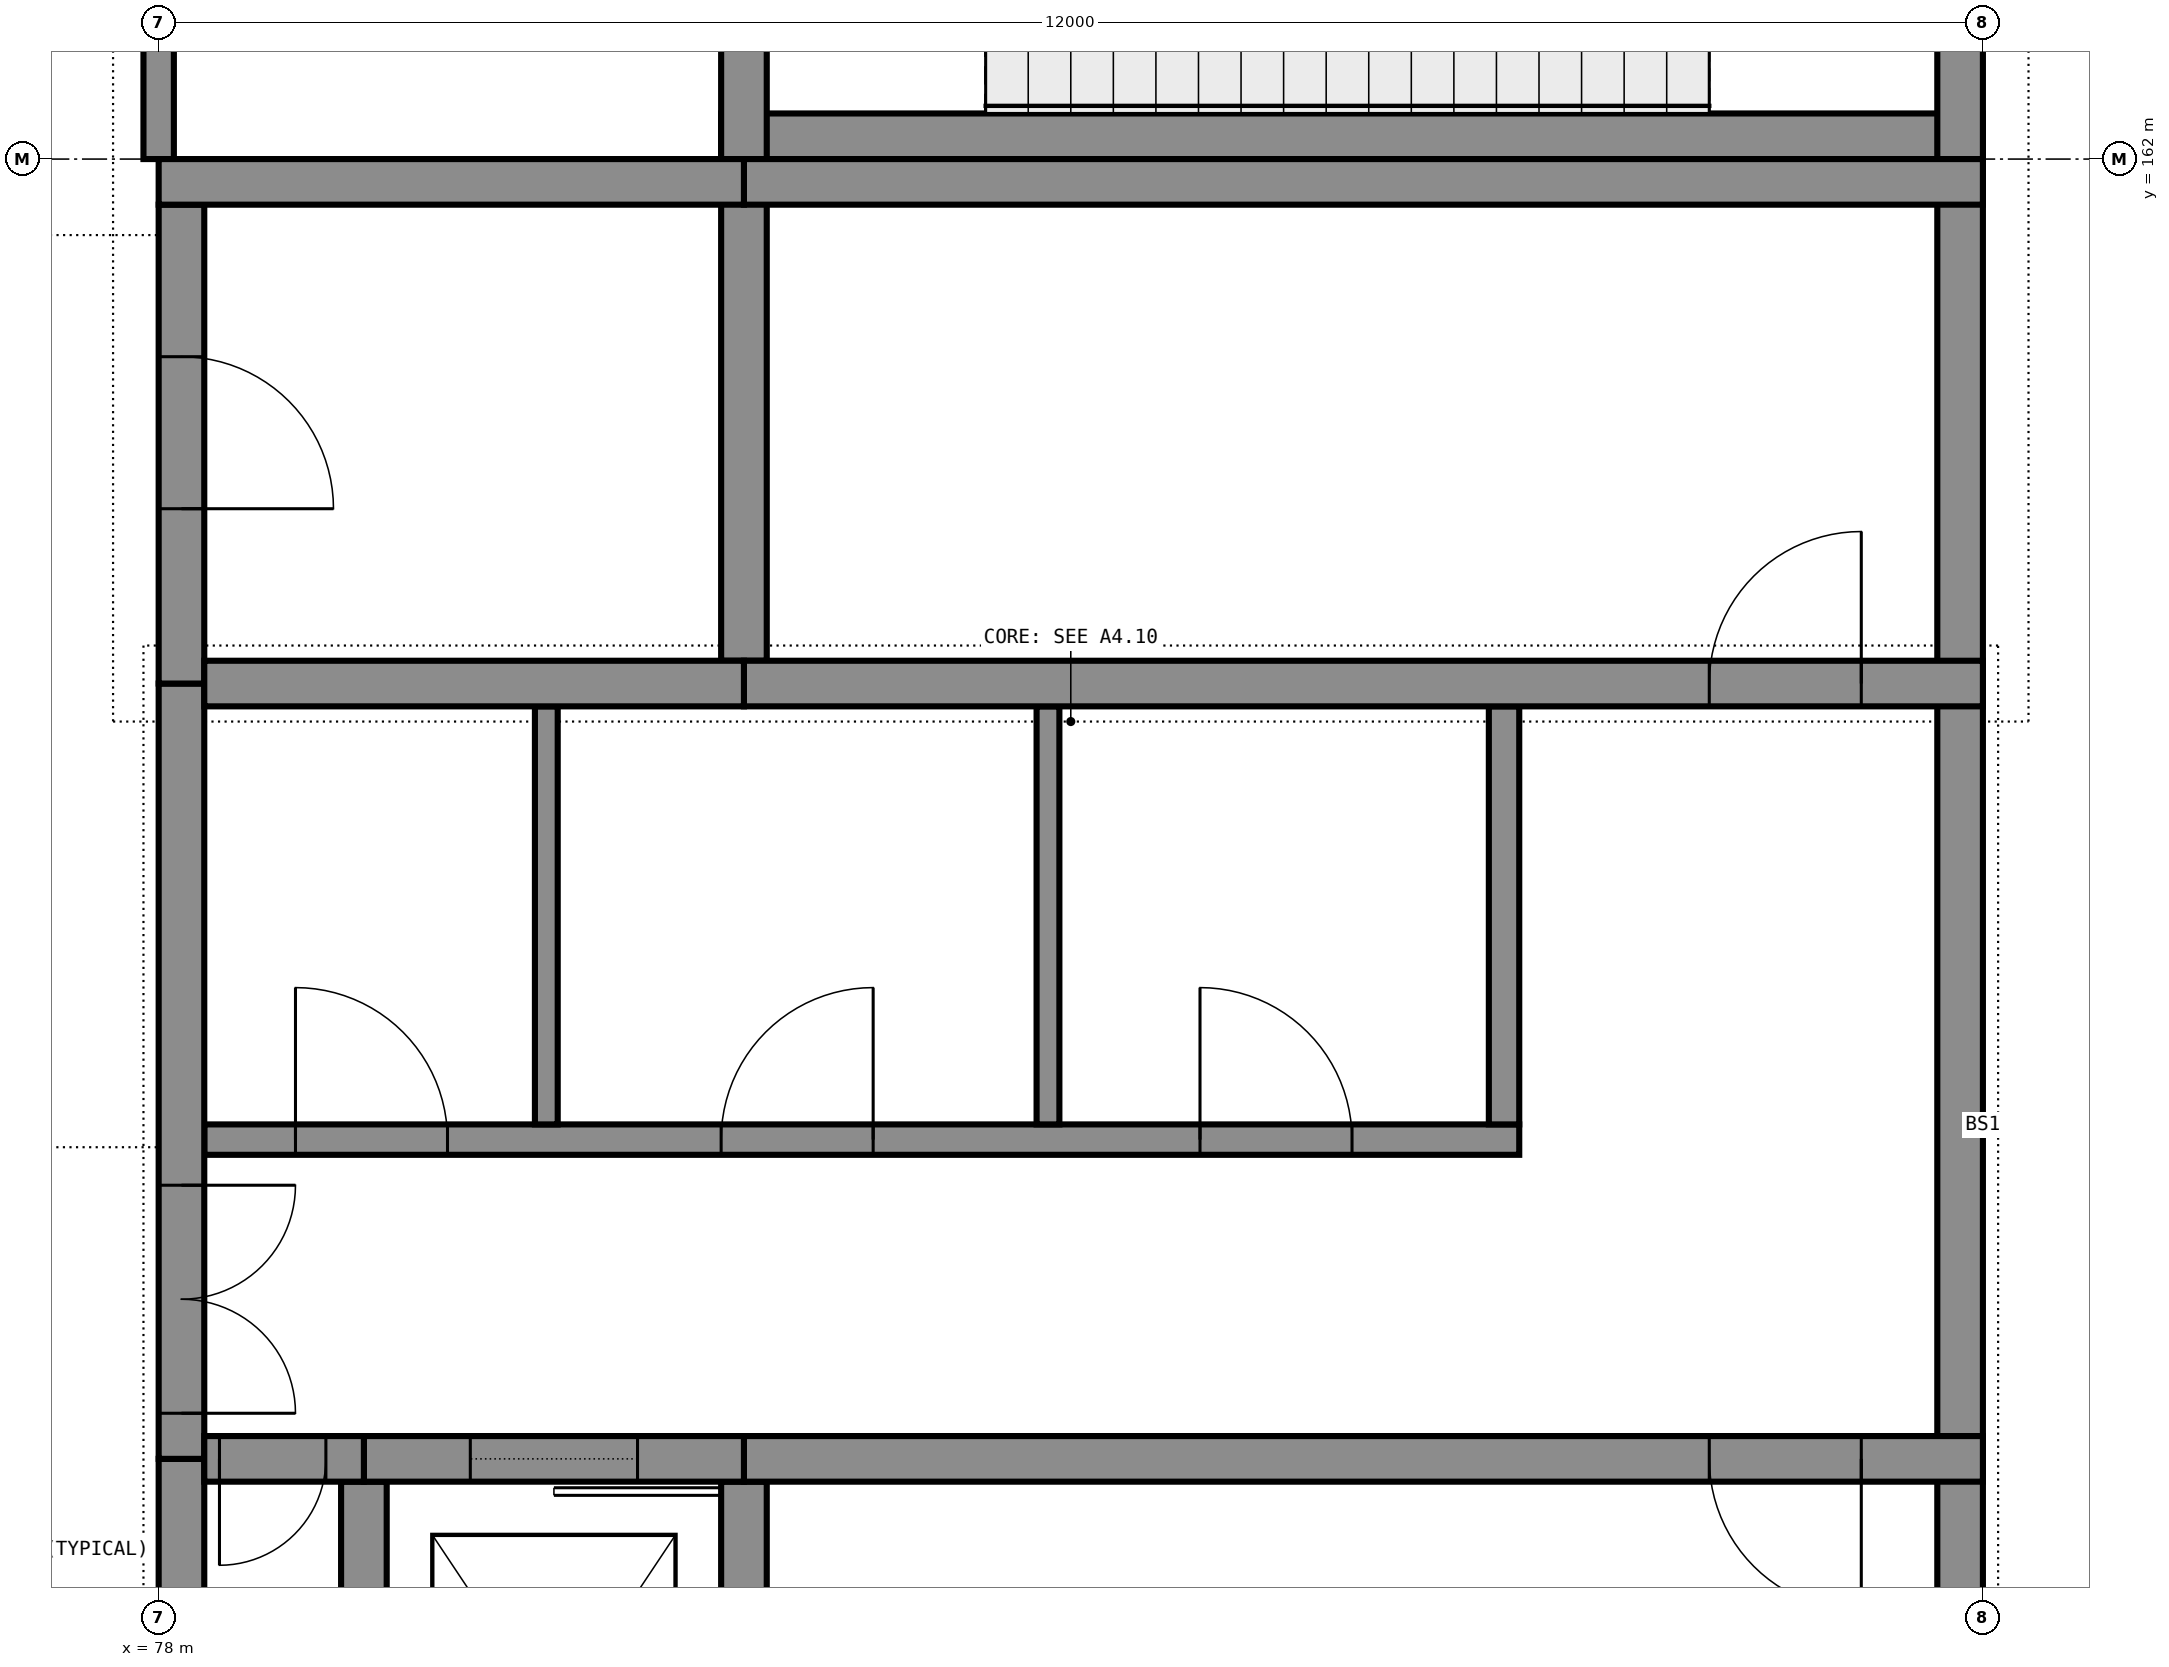
"""IFC4 building model, lengths in metres.
Left out: names, types, materials, properties, quantities, classifications, styles, units other than length and angle.
Written with IfcOpenShell. Run it as: python <this file> out.ifc"""

import sys

from ifc_helpers import new_model, si_unit, direction, frame, frame_2d, origin, place, context, subcontext, project, spatial, rectangle, extrude, element, fill, save


model = new_model("IFC4")
c1 = context("Model", 3, precision=1e-05, world=origin(), true_north=direction((0.0, 1.0)))
c2 = subcontext(c1, "Body", "Model", "MODEL_VIEW")
j1 = project(units=[si_unit("LENGTHUNIT", "METRE"), si_unit("PLANEANGLEUNIT", "RADIAN")], contexts=[c1])
p1 = place(None, origin())
s1 = spatial("IfcSite", under=j1, at=p1, CompositionType="ELEMENT")
p2 = place(p1, origin())
s2 = spatial("IfcBuilding", under=s1, at=p2, CompositionType="ELEMENT")
p3 = place(p2, frame((0.0, 0.0, -6.0)))
s3 = spatial("IfcBuildingStorey", under=s2, at=p3, CompositionType="ELEMENT", Elevation=-6.0)
p4 = place(p3, frame((90.0, 162.15, 0.0), z_axis=(0.0, 0.0, 1.0), x_axis=(-1.0, 0.0, 0.0)))
e1 = element("IfcWall", 1, at=p4, inside=s3, PredefinedType="SHEAR", context=c2, shape_type="SweptSolid", body=[
    extrude(rectangle(XDim=8.3, YDim=0.3, at=frame_2d((4.15, 0.0))), origin(), (0.0, 0.0, 1.0), 5.7),
])
for number, where, z_axis, x_axis in (
    (2, (89.85, 162.0, 0.0), (0.0, 0.0, 1.0), (0.0, 1.0, 0.0)),
    (3, (81.85, 162.0, 0.0), (0.0, 0.0, 1.0), (0.0, 1.0, 0.0)),
):
    element("IfcWall", number, at=place(p3, frame(where, z_axis=z_axis, x_axis=x_axis)), inside=s3, PredefinedType="SHEAR", context=c2, shape_type="SweptSolid", body=[
        extrude(rectangle(XDim=3.3, YDim=0.3, at=frame_2d((1.65, 0.0))), origin(), (0.0, 0.0, 1.0), 5.7),
    ])
p5 = place(p3, frame((90.0, 161.85, 0.0), z_axis=(0.0, 0.0, 1.0), x_axis=(-1.0, 0.0, 0.0)))
e4 = element("IfcWall", 4, at=p5, inside=s3, PredefinedType="SHEAR", context=c2, shape_type="SweptSolid", body=[
    extrude(rectangle(XDim=8.15, YDim=0.3, at=frame_2d((4.075, 0.0))), origin(), (0.0, 0.0, 1.0), 5.7),
])
p6 = place(p3, frame((81.85, 161.85, 0.0), z_axis=(0.0, 0.0, 1.0), x_axis=(-1.0, 0.0, 0.0)))
e5 = element("IfcWall", 5, at=p6, inside=s3, PredefinedType="SHEAR", context=c2, shape_type="SweptSolid", body=[
    extrude(rectangle(XDim=3.85, YDim=0.3, at=frame_2d((1.925, 0.0))), origin(), (0.0, 0.0, 1.0), 5.7),
])
p7 = place(p3, frame((90.0, 153.45, 0.0), z_axis=(0.0, 0.0, 1.0), x_axis=(-1.0, 0.0, 0.0)))
e6 = element("IfcWall", 6, at=p7, inside=s3, PredefinedType="SHEAR", context=c2, shape_type="SweptSolid", body=[
    extrude(rectangle(XDim=8.15, YDim=0.3, at=frame_2d((4.075, 0.0))), origin(), (0.0, 0.0, 1.0), 5.7),
])
p8 = place(p7, frame((0.8, 0.0, 0.0)))
e7 = element("IfcOpeningElement", 7, at=p8, cuts=e6, PredefinedType="OPENING", context=c2, shape_type="SweptSolid", body=[
    extrude(rectangle(XDim=1.0, YDim=2.1, at=frame_2d((0.5, 1.05))), frame((0.0, 0.16, 0.0), z_axis=(0.0, -1.0, 0.0), x_axis=(1.0, 0.0, 0.0)), (0.0, 0.0, 1.0), 0.32),
])
p9 = place(p3, frame((81.85, 153.45, 0.0), z_axis=(0.0, 0.0, 1.0), x_axis=(-1.0, 0.0, 0.0)))
e8 = element("IfcWall", 8, at=p9, inside=s3, PredefinedType="SHEAR", context=c2, shape_type="SweptSolid", body=[
    extrude(rectangle(XDim=2.5, YDim=0.3, at=frame_2d((1.25, 0.0))), origin(), (0.0, 0.0, 1.0), 5.7),
])
p10 = place(p9, frame((0.7, 0.0, 0.0)))
e9 = element("IfcOpeningElement", 9, at=p10, cuts=e8, PredefinedType="OPENING", context=c2, shape_type="SweptSolid", body=[
    extrude(rectangle(XDim=1.1, YDim=2.1, at=frame_2d((0.55, 1.05))), frame((0.0, 0.16, 0.0), z_axis=(0.0, -1.0, 0.0), x_axis=(1.0, 0.0, 0.0)), (0.0, 0.0, 1.0), 0.32),
])
p11 = place(p3, frame((79.35, 153.45, 0.0), z_axis=(0.0, 0.0, 1.0), x_axis=(-1.0, 0.0, 0.0)))
e10 = element("IfcWall", 10, at=p11, inside=s3, PredefinedType="SHEAR", context=c2, shape_type="SweptSolid", body=[
    extrude(rectangle(XDim=1.05, YDim=0.3, at=frame_2d((0.525, 0.0))), origin(), (0.0, 0.0, 1.0), 5.7),
])
p12 = place(p11, frame((0.25, 0.0, 0.0)))
e11 = element("IfcOpeningElement", 11, at=p12, cuts=e10, PredefinedType="OPENING", context=c2, shape_type="SweptSolid", body=[
    extrude(rectangle(XDim=0.7, YDim=2.1, at=frame_2d((0.35, 1.05))), frame((0.0, 0.16, 0.0), z_axis=(0.0, -1.0, 0.0), x_axis=(1.0, 0.0, 0.0)), (0.0, 0.0, 1.0), 0.32),
])
p13 = place(p3, frame((90.0, 158.55, 0.0), z_axis=(0.0, 0.0, 1.0), x_axis=(-1.0, 0.0, 0.0)))
e12 = element("IfcWall", 12, at=p13, inside=s3, PredefinedType="SHEAR", context=c2, shape_type="SweptSolid", body=[
    extrude(rectangle(XDim=8.15, YDim=0.3, at=frame_2d((4.075, 0.0))), origin(), (0.0, 0.0, 1.0), 5.7),
])
p14 = place(p13, frame((0.8, 0.0, 0.0)))
e13 = element("IfcOpeningElement", 13, at=p14, cuts=e12, PredefinedType="OPENING", context=c2, shape_type="SweptSolid", body=[
    extrude(rectangle(XDim=1.0, YDim=2.1, at=frame_2d((0.5, 1.05))), frame((0.0, 0.16, 0.0), z_axis=(0.0, -1.0, 0.0), x_axis=(1.0, 0.0, 0.0)), (0.0, 0.0, 1.0), 0.32),
])
p15 = place(p3, frame((81.85, 158.55, 0.0), z_axis=(0.0, 0.0, 1.0), x_axis=(-1.0, 0.0, 0.0)))
e14 = element("IfcWall", 14, at=p15, inside=s3, PredefinedType="SHEAR", context=c2, shape_type="SweptSolid", body=[
    extrude(rectangle(XDim=3.55, YDim=0.3, at=frame_2d((1.775, 0.0))), origin(), (0.0, 0.0, 1.0), 5.7),
])
p16 = place(p3, frame((89.85, 150.3, 0.0), z_axis=(0.0, 0.0, 1.0), x_axis=(0.0, 1.0, 0.0)))
e15 = element("IfcWall", 15, at=p16, inside=s3, PredefinedType="SHEAR", context=c2, shape_type="SweptSolid", body=[
    extrude(rectangle(XDim=3.15, YDim=0.3, at=frame_2d((1.575, 0.0))), origin(), (0.0, 0.0, 1.0), 5.7),
])
p17 = place(p3, frame((89.85, 153.45, 0.0), z_axis=(0.0, 0.0, 1.0), x_axis=(0.0, 1.0, 0.0)))
e16 = element("IfcWall", 16, at=p17, inside=s3, PredefinedType="SHEAR", context=c2, shape_type="SweptSolid", body=[
    extrude(rectangle(XDim=5.1, YDim=0.3, at=frame_2d((2.55, 0.0))), origin(), (0.0, 0.0, 1.0), 5.7),
])
p18 = place(p3, frame((89.85, 158.55, 0.0), z_axis=(0.0, 0.0, 1.0), x_axis=(0.0, 1.0, 0.0)))
e17 = element("IfcWall", 17, at=p18, inside=s3, PredefinedType="SHEAR", context=c2, shape_type="SweptSolid", body=[
    extrude(rectangle(XDim=3.45, YDim=0.3, at=frame_2d((1.725, 0.0))), origin(), (0.0, 0.0, 1.0), 5.7),
])
p19 = place(p3, frame((78.15, 150.3, 0.0), z_axis=(0.0, 0.0, 1.0), x_axis=(0.0, 1.0, 0.0)))
e18 = element("IfcWall", 18, at=p19, inside=s3, PredefinedType="SHEAR", context=c2, shape_type="SweptSolid", body=[
    extrude(rectangle(XDim=3.15, YDim=0.3, at=frame_2d((1.575, 0.0))), origin(), (0.0, 0.0, 1.0), 5.7),
])
p20 = place(p3, frame((78.15, 153.45, 0.0), z_axis=(0.0, 0.0, 1.0), x_axis=(0.0, 1.0, 0.0)))
e19 = element("IfcWall", 19, at=p20, inside=s3, PredefinedType="SHEAR", context=c2, shape_type="SweptSolid", body=[
    extrude(rectangle(XDim=5.1, YDim=0.3, at=frame_2d((2.55, 0.0))), origin(), (0.0, 0.0, 1.0), 5.7),
])
p21 = place(p20, frame((0.3, 0.0, 0.0)))
e20 = element("IfcOpeningElement", 20, at=p21, cuts=e19, PredefinedType="OPENING", context=c2, shape_type="SweptSolid", body=[
    extrude(rectangle(XDim=1.5, YDim=2.1, at=frame_2d((0.75, 1.05))), frame((0.0, 0.16, 0.0), z_axis=(0.0, -1.0, 0.0), x_axis=(1.0, 0.0, 0.0)), (0.0, 0.0, 1.0), 0.32),
])
p22 = place(p3, frame((78.15, 158.55, 0.0), z_axis=(0.0, 0.0, 1.0), x_axis=(0.0, 1.0, 0.0)))
e21 = element("IfcWall", 21, at=p22, inside=s3, PredefinedType="SHEAR", context=c2, shape_type="SweptSolid", body=[
    extrude(rectangle(XDim=3.15, YDim=0.3, at=frame_2d((1.575, 0.0))), origin(), (0.0, 0.0, 1.0), 5.7),
])
p23 = place(p22, frame((1.15, 0.0, 0.0)))
e22 = element("IfcOpeningElement", 22, at=p23, cuts=e21, PredefinedType="OPENING", context=c2, shape_type="SweptSolid", body=[
    extrude(rectangle(XDim=1.0, YDim=2.1, at=frame_2d((0.5, 1.05))), frame((0.0, 0.16, 0.0), z_axis=(0.0, -1.0, 0.0), x_axis=(1.0, 0.0, 0.0)), (0.0, 0.0, 1.0), 0.32),
])
p24 = place(p3, frame((81.85, 150.3, 0.0), z_axis=(0.0, 0.0, 1.0), x_axis=(0.0, 1.0, 0.0)))
e23 = element("IfcWall", 23, at=p24, inside=s3, PredefinedType="SHEAR", context=c2, shape_type="SweptSolid", body=[
    extrude(rectangle(XDim=3.0, YDim=0.3, at=frame_2d((1.5, 0.0))), origin(), (0.0, 0.0, 1.0), 5.7),
])
p25 = place(p3, frame((81.85, 158.7, 0.0), z_axis=(0.0, 0.0, 1.0), x_axis=(0.0, 1.0, 0.0)))
e24 = element("IfcWall", 24, at=p25, inside=s3, PredefinedType="SHEAR", context=c2, shape_type="SweptSolid", body=[
    extrude(rectangle(XDim=3.3, YDim=0.3, at=frame_2d((1.65, 0.0))), origin(), (0.0, 0.0, 1.0), 5.7),
])
p26 = place(p3, frame((79.35, 150.3, 0.0), z_axis=(0.0, 0.0, 1.0), x_axis=(0.0, 1.0, 0.0)))
e25 = element("IfcWall", 25, at=p26, inside=s3, PredefinedType="SHEAR", context=c2, shape_type="SweptSolid", body=[
    extrude(rectangle(XDim=3.0, YDim=0.3, at=frame_2d((1.5, 0.0))), origin(), (0.0, 0.0, 1.0), 5.7),
])
p27 = place(p3, frame((78.3, 155.55, 0.0), z_axis=(0.0, 0.0, 1.0), x_axis=(1.0, 0.0, 0.0)))
e26 = element("IfcWall", 26, at=p27, inside=s3, PredefinedType="PARTITIONING", context=c2, shape_type="SweptSolid", body=[
    extrude(rectangle(XDim=8.65, YDim=0.2, at=frame_2d((4.325, 0.0))), origin(), (0.0, 0.0, 1.0), 5.7),
])
p28 = place(p27, frame((0.6, 0.0, 0.0)))
e27 = element("IfcOpeningElement", 27, at=p28, cuts=e26, PredefinedType="OPENING", context=c2, shape_type="SweptSolid", body=[
    extrude(rectangle(XDim=1.0, YDim=2.1, at=frame_2d((0.5, 1.05))), frame((0.0, 0.11, 0.0), z_axis=(0.0, -1.0, 0.0), x_axis=(1.0, 0.0, 0.0)), (0.0, 0.0, 1.0), 0.22),
])
p29 = place(p27, frame((3.4, 0.0, 0.0)))
e28 = element("IfcOpeningElement", 28, at=p29, cuts=e26, PredefinedType="OPENING", context=c2, shape_type="SweptSolid", body=[
    extrude(rectangle(XDim=1.0, YDim=2.1, at=frame_2d((0.5, 1.05))), frame((0.0, 0.11, 0.0), z_axis=(0.0, -1.0, 0.0), x_axis=(1.0, 0.0, 0.0)), (0.0, 0.0, 1.0), 0.22),
])
p30 = place(p27, frame((6.55, 0.0, 0.0)))
e29 = element("IfcOpeningElement", 29, at=p30, cuts=e26, PredefinedType="OPENING", context=c2, shape_type="SweptSolid", body=[
    extrude(rectangle(XDim=1.0, YDim=2.1, at=frame_2d((0.5, 1.05))), frame((0.0, 0.11, 0.0), z_axis=(0.0, -1.0, 0.0), x_axis=(1.0, 0.0, 0.0)), (0.0, 0.0, 1.0), 0.22),
])
p31 = place(p3, frame((78.0, 162.0, 0.0), z_axis=(0.0, 0.0, 1.0), x_axis=(0.0, 1.0, 0.0)))
e30 = element("IfcWall", 30, at=p31, inside=s3, PredefinedType="PARTITIONING", context=c2, shape_type="SweptSolid", body=[
    extrude(rectangle(XDim=5.9, YDim=0.2, at=frame_2d((2.95, 0.0))), origin(), (0.0, 0.0, 1.0), 4.7),
])
p32 = place(p31, frame((1.2, 0.0, 0.0)))
e31 = element("IfcOpeningElement", 31, at=p32, cuts=e30, PredefinedType="OPENING", context=c2, shape_type="SweptSolid", body=[
    extrude(rectangle(XDim=1.2, YDim=2.1, at=frame_2d((0.6, 1.05))), frame((0.0, 0.11, 0.0), z_axis=(0.0, -1.0, 0.0), x_axis=(1.0, 0.0, 0.0)), (0.0, 0.0, 1.0), 0.22),
])
for number, where, z_axis, x_axis in (
    (32, (80.55, 155.65, 0.0), (0.0, 0.0, 1.0), (0.0, 1.0, 0.0)),
    (33, (83.85, 155.65, 0.0), (0.0, 0.0, 1.0), (0.0, 1.0, 0.0)),
):
    element("IfcWall", number, at=place(p3, frame(where, z_axis=z_axis, x_axis=x_axis)), inside=s3, PredefinedType="PARTITIONING", context=c2, shape_type="SweptSolid", body=[
        extrude(rectangle(XDim=2.75, YDim=0.15, at=frame_2d((1.375, 0.0))), origin(), (0.0, 0.0, 1.0), 5.7),
    ])
p33 = place(p3, frame((86.85, 155.65, 0.0), z_axis=(0.0, 0.0, 1.0), x_axis=(0.0, 1.0, 0.0)))
e34 = element("IfcWall", 34, at=p33, inside=s3, PredefinedType="PARTITIONING", context=c2, shape_type="SweptSolid", body=[
    extrude(rectangle(XDim=2.75, YDim=0.2, at=frame_2d((1.375, 0.0))), origin(), (0.0, 0.0, 1.0), 5.7),
])
p34 = place(p12, origin())
e35 = element("IfcDoor", 35, at=p34, inside=s3, OperationType="SINGLE_SWING_LEFT", PredefinedType="DOOR", context=c2, shape_type="SweptSolid", body=[
    extrude(rectangle(XDim=0.7, YDim=2.1, at=frame_2d((0.35, 1.05))), frame((0.0, 0.025, 0.0), z_axis=(0.0, -1.0, 0.0), x_axis=(1.0, 0.0, 0.0)), (0.0, 0.0, 1.0), 0.05),
])
fill(e11, e35)
p35 = place(p10, origin())
e36 = element("IfcDoor", 36, at=p35, inside=s3, OperationType="SLIDING_TO_LEFT", PredefinedType="DOOR", context=c2, shape_type="SweptSolid", body=[
    extrude(rectangle(XDim=1.1, YDim=2.1, at=frame_2d((0.55, 1.05))), frame((0.0, 0.025, 0.0), z_axis=(0.0, -1.0, 0.0), x_axis=(1.0, 0.0, 0.0)), (0.0, 0.0, 1.0), 0.05),
])
fill(e9, e36)
p36 = place(p8, origin())
e37 = element("IfcDoor", 37, at=p36, inside=s3, OperationType="SINGLE_SWING_RIGHT", PredefinedType="DOOR", context=c2, shape_type="SweptSolid", body=[
    extrude(rectangle(XDim=1.0, YDim=2.1, at=frame_2d((0.5, 1.05))), frame((0.0, 0.025, 0.0), z_axis=(0.0, -1.0, 0.0), x_axis=(1.0, 0.0, 0.0)), (0.0, 0.0, 1.0), 0.05),
])
fill(e7, e37)
p37 = place(p21, frame((1.5, 0.0, 0.0), z_axis=(0.0, 0.0, 1.0), x_axis=(-1.0, 0.0, 0.0)))
e38 = element("IfcDoor", 38, at=p37, inside=s3, OperationType="DOUBLE_DOOR_SINGLE_SWING", PredefinedType="DOOR", context=c2, shape_type="SweptSolid", body=[
    extrude(rectangle(XDim=1.5, YDim=2.1, at=frame_2d((0.75, 1.05))), frame((0.0, 0.025, 0.0), z_axis=(0.0, -1.0, 0.0), x_axis=(1.0, 0.0, 0.0)), (0.0, 0.0, 1.0), 0.05),
])
fill(e20, e38)
p38 = place(p28, origin())
e39 = element("IfcDoor", 39, at=p38, inside=s3, OperationType="SINGLE_SWING_RIGHT", PredefinedType="DOOR", context=c2, shape_type="SweptSolid", body=[
    extrude(rectangle(XDim=1.0, YDim=2.1, at=frame_2d((0.5, 1.05))), frame((0.0, 0.025, 0.0), z_axis=(0.0, -1.0, 0.0), x_axis=(1.0, 0.0, 0.0)), (0.0, 0.0, 1.0), 0.05),
])
fill(e27, e39)
p39 = place(p29, origin())
e40 = element("IfcDoor", 40, at=p39, inside=s3, OperationType="SINGLE_SWING_LEFT", PredefinedType="DOOR", context=c2, shape_type="SweptSolid", body=[
    extrude(rectangle(XDim=1.0, YDim=2.1, at=frame_2d((0.5, 1.05))), frame((0.0, 0.025, 0.0), z_axis=(0.0, -1.0, 0.0), x_axis=(1.0, 0.0, 0.0)), (0.0, 0.0, 1.0), 0.05),
])
fill(e28, e40)
p40 = place(p30, origin())
e41 = element("IfcDoor", 41, at=p40, inside=s3, OperationType="SINGLE_SWING_RIGHT", PredefinedType="DOOR", context=c2, shape_type="SweptSolid", body=[
    extrude(rectangle(XDim=1.0, YDim=2.1, at=frame_2d((0.5, 1.05))), frame((0.0, 0.025, 0.0), z_axis=(0.0, -1.0, 0.0), x_axis=(1.0, 0.0, 0.0)), (0.0, 0.0, 1.0), 0.05),
])
fill(e29, e41)
p41 = place(p14, frame((1.0, 0.0, 0.0), z_axis=(0.0, 0.0, 1.0), x_axis=(-1.0, 0.0, 0.0)))
e42 = element("IfcDoor", 42, at=p41, inside=s3, OperationType="SINGLE_SWING_LEFT", PredefinedType="DOOR", context=c2, shape_type="SweptSolid", body=[
    extrude(rectangle(XDim=1.0, YDim=2.1, at=frame_2d((0.5, 1.05))), frame((0.0, 0.025, 0.0), z_axis=(0.0, -1.0, 0.0), x_axis=(1.0, 0.0, 0.0)), (0.0, 0.0, 1.0), 0.05),
])
fill(e13, e42)
p42 = place(p23, frame((1.0, 0.0, 0.0), z_axis=(0.0, 0.0, 1.0), x_axis=(-1.0, 0.0, 0.0)))
e43 = element("IfcDoor", 43, at=p42, inside=s3, OperationType="SINGLE_SWING_LEFT", PredefinedType="DOOR", context=c2, shape_type="SweptSolid", body=[
    extrude(rectangle(XDim=1.0, YDim=2.1, at=frame_2d((0.5, 1.05))), frame((0.0, 0.025, 0.0), z_axis=(0.0, -1.0, 0.0), x_axis=(1.0, 0.0, 0.0)), (0.0, 0.0, 1.0), 0.05),
])
fill(e22, e43)
save(model, sys.argv[1])
